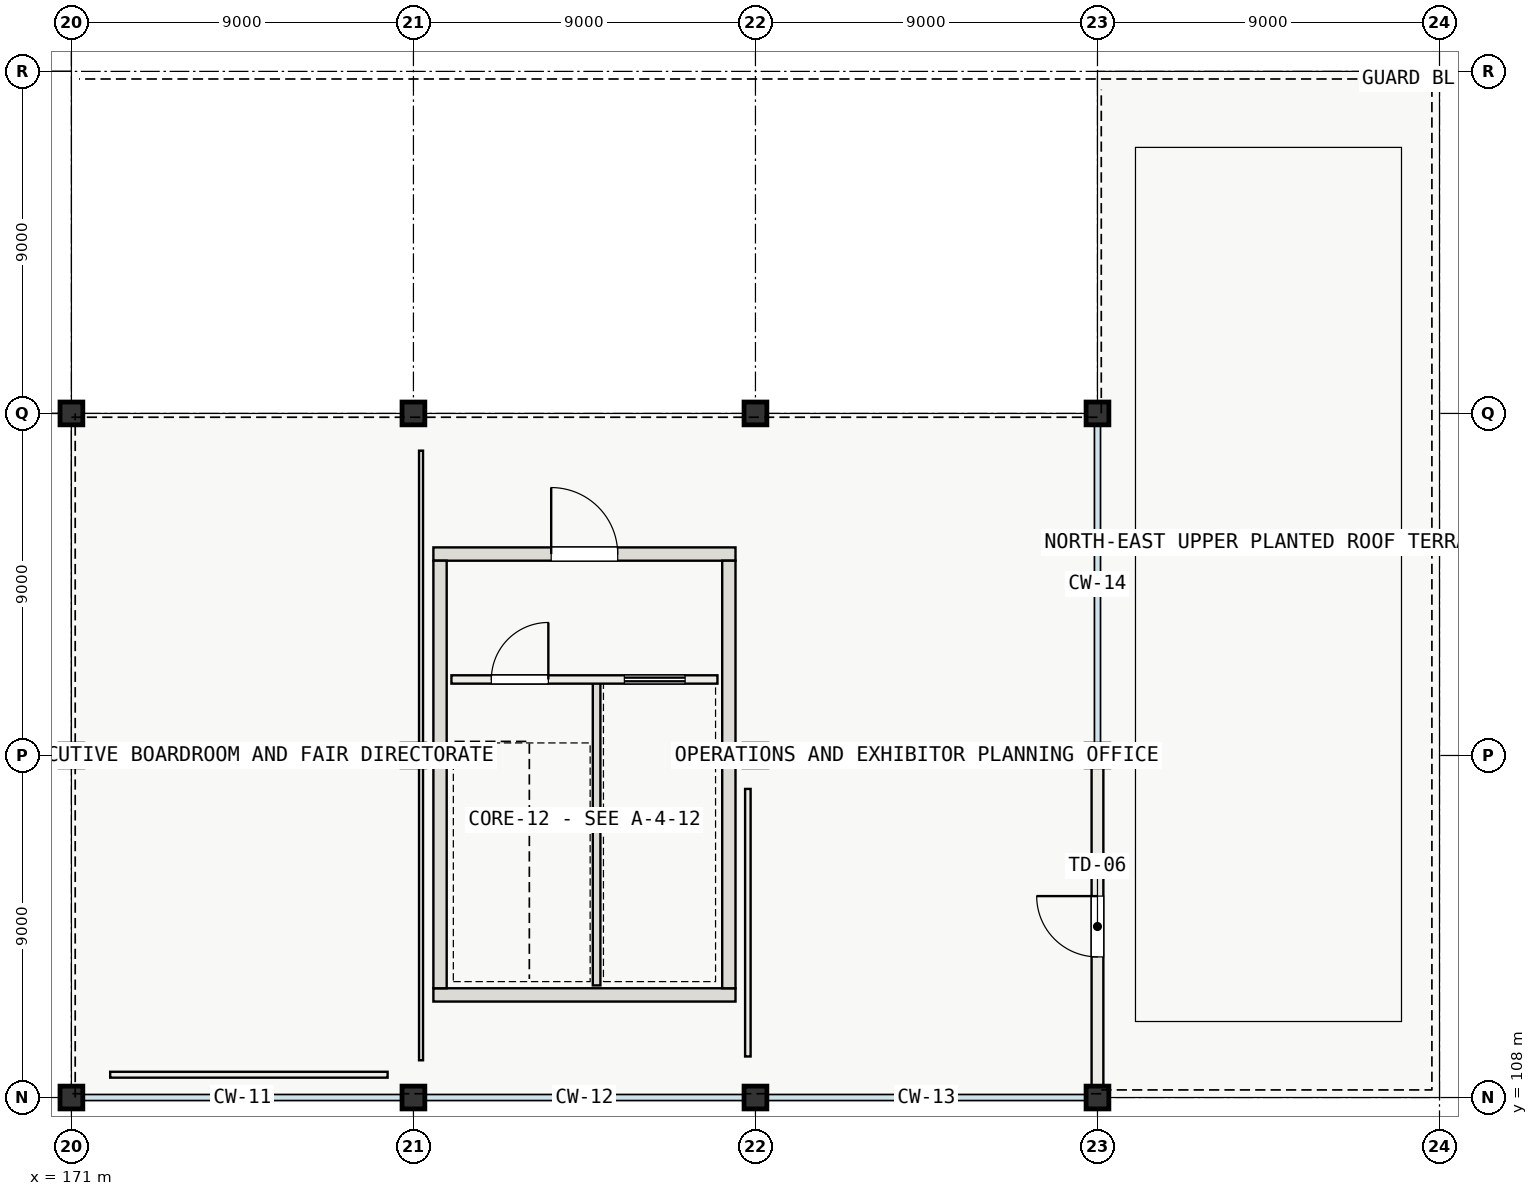
"""IFC4 building model, lengths in metres.
Left out: names, types, materials, properties, quantities, classifications, styles, units other than length and angle.
Written with IfcOpenShell. Run it as: python <this file> out.ifc"""

import sys

from ifc_helpers import new_model, si_unit, direction, frame, frame_2d, origin, origin_2d, place, context, subcontext, project, spatial, rectangle, extrude, element, fill, save


model = new_model("IFC4")
c1 = context("Model", 3, precision=1e-05, world=origin(), true_north=direction((0.0, 1.0)))
c2 = subcontext(c1, "Body", "Model", "MODEL_VIEW")
j1 = project(units=[si_unit("LENGTHUNIT", "METRE"), si_unit("PLANEANGLEUNIT", "RADIAN")], contexts=[c1])
p1 = place(None, origin())
s1 = spatial("IfcSite", under=j1, at=p1, CompositionType="ELEMENT")
p2 = place(p1, origin())
s2 = spatial("IfcBuilding", under=s1, at=p2, CompositionType="ELEMENT")
p3 = place(p2, frame((0.0, 0.0, 16.8)))
s3 = spatial("IfcBuildingStorey", under=s2, at=p3, CompositionType="ELEMENT", Elevation=16.8)
p4 = place(p3, frame((180.525, 110.7, 0.0), z_axis=(0.0, 0.0, 1.0), x_axis=(1.0, 0.0, 0.0)))
e1 = element("IfcWall", 1, at=p4, inside=s3, PredefinedType="SHEAR", context=c2, shape_type="SweptSolid", body=[
    extrude(rectangle(XDim=7.95, YDim=0.35, at=frame_2d((3.975, 0.0))), origin(), (0.0, 0.0, 1.0), 4.8),
])
p5 = place(p3, frame((180.525, 122.3, 0.0), z_axis=(0.0, 0.0, 1.0), x_axis=(1.0, 0.0, 0.0)))
e2 = element("IfcWall", 2, at=p5, inside=s3, PredefinedType="SHEAR", context=c2, shape_type="SweptSolid", body=[
    extrude(rectangle(XDim=7.95, YDim=0.35, at=frame_2d((3.975, 0.0))), origin(), (0.0, 0.0, 1.0), 4.8),
])
p6 = place(p5, frame((3.1, 0.0, 0.0)))
e3 = element("IfcOpeningElement", 3, at=p6, cuts=e2, PredefinedType="OPENING", context=c2, shape_type="SweptSolid", body=[
    extrude(rectangle(XDim=1.75, YDim=2.3, at=frame_2d((0.875, 1.15))), frame((0.0, 0.185, 0.0), z_axis=(0.0, -1.0, 0.0), x_axis=(1.0, 0.0, 0.0)), (0.0, 0.0, 1.0), 0.37),
])
for number, where, z_axis, x_axis in (
    (4, (180.7, 110.875, 0.0), (0.0, 0.0, 1.0), (0.0, 1.0, 0.0)),
    (5, (188.3, 110.875, 0.0), (0.0, 0.0, 1.0), (0.0, 1.0, 0.0)),
):
    element("IfcWall", number, at=place(p3, frame(where, z_axis=z_axis, x_axis=x_axis)), inside=s3, PredefinedType="SHEAR", context=c2, shape_type="SweptSolid", body=[
        extrude(rectangle(XDim=11.25, YDim=0.35, at=frame_2d((5.625, 0.0))), origin(), (0.0, 0.0, 1.0), 4.8),
    ])
for number, where, z_axis, x_axis in (
    (6, (171.0, 108.0, 0.0), (0.0, 0.0, 1.0), (1.0, 0.0, 0.0)),
    (7, (171.0, 117.0, 0.0), (0.0, 0.0, 1.0), (1.0, 0.0, 0.0)),
    (8, (171.0, 126.0, 0.0), (0.0, 0.0, 1.0), (1.0, 0.0, 0.0)),
    (9, (180.0, 108.0, 0.0), (0.0, 0.0, 1.0), (1.0, 0.0, 0.0)),
    (10, (180.0, 117.0, 0.0), (0.0, 0.0, 1.0), (1.0, 0.0, 0.0)),
    (11, (180.0, 126.0, 0.0), (0.0, 0.0, 1.0), (1.0, 0.0, 0.0)),
    (12, (189.0, 108.0, 0.0), (0.0, 0.0, 1.0), (1.0, 0.0, 0.0)),
    (13, (189.0, 117.0, 0.0), (0.0, 0.0, 1.0), (1.0, 0.0, 0.0)),
    (14, (189.0, 126.0, 0.0), (0.0, 0.0, 1.0), (1.0, 0.0, 0.0)),
    (15, (198.0, 108.0, 0.0), (0.0, 0.0, 1.0), (1.0, 0.0, 0.0)),
    (16, (198.0, 117.0, 0.0), (0.0, 0.0, 1.0), (1.0, 0.0, 0.0)),
    (17, (198.0, 126.0, 0.0), (0.0, 0.0, 1.0), (1.0, 0.0, 0.0)),
):
    element("IfcColumn", number, at=place(p3, frame(where, z_axis=z_axis, x_axis=x_axis)), inside=s3, PredefinedType="COLUMN", context=c2, shape_type="SweptSolid", body=[
        extrude(rectangle(XDim=0.6, YDim=0.6, at=origin_2d()), origin(), (0.0, 0.0, 1.0), 4.8),
    ])
p7 = place(p3, frame((198.0, 108.3, 0.0), z_axis=(0.0, 0.0, 1.0), x_axis=(0.0, 1.0, 0.0)))
e18 = element("IfcWall", 18, at=p7, inside=s3, PredefinedType="SOLIDWALL", context=c2, shape_type="SweptSolid", body=[
    extrude(rectangle(XDim=8.401, YDim=0.31, at=frame_2d((4.2, 0.0))), origin(), (0.0, 0.0, 1.0), 4.02),
])
p8 = place(p7, frame((3.4, 0.0, 0.0)))
e19 = element("IfcOpeningElement", 19, at=p8, cuts=e18, PredefinedType="OPENING", context=c2, shape_type="SweptSolid", body=[
    extrude(rectangle(XDim=1.6, YDim=2.2, at=frame_2d((0.8, 1.1))), frame((0.0, 0.165, 0.0), z_axis=(0.0, -1.0, 0.0), x_axis=(1.0, 0.0, 0.0)), (0.0, 0.0, 1.0), 0.33),
])
p9 = place(p3, frame((184.82, 110.95, 0.0), z_axis=(0.0, 0.0, 1.0), x_axis=(0.0, 1.0, 0.0)))
e20 = element("IfcWall", 20, at=p9, inside=s3, PredefinedType="SOLIDWALL", context=c2, shape_type="SweptSolid", body=[
    extrude(rectangle(XDim=8.0, YDim=0.2, at=frame_2d((4.0, 0.0))), origin(), (0.0, 0.0, 1.0), 4.8),
])
p10 = place(p3, frame((181.0, 119.0, 0.0), z_axis=(0.0, 0.0, 1.0), x_axis=(1.0, 0.0, 0.0)))
e21 = element("IfcWall", 21, at=p10, inside=s3, PredefinedType="SOLIDWALL", context=c2, shape_type="SweptSolid", body=[
    extrude(rectangle(XDim=7.0, YDim=0.22, at=frame_2d((3.5, 0.0))), origin(), (0.0, 0.0, 1.0), 4.49),
])
p11 = place(p10, frame((1.05, 0.0, 0.0)))
e22 = element("IfcOpeningElement", 22, at=p11, cuts=e21, PredefinedType="OPENING", context=c2, shape_type="SweptSolid", body=[
    extrude(rectangle(XDim=1.5, YDim=2.2, at=frame_2d((0.75, 1.1))), frame((0.0, 0.12, 0.0), z_axis=(0.0, -1.0, 0.0), x_axis=(1.0, 0.0, 0.0)), (0.0, 0.0, 1.0), 0.24),
])
p12 = place(p10, frame((4.55, 0.0, 0.0)))
e23 = element("IfcOpeningElement", 23, at=p12, cuts=e21, PredefinedType="OPENING", context=c2, shape_type="SweptSolid", body=[
    extrude(rectangle(XDim=1.6, YDim=2.3, at=frame_2d((0.8, 1.15))), frame((0.0, 0.12, 0.0), z_axis=(0.0, -1.0, 0.0), x_axis=(1.0, 0.0, 0.0)), (0.0, 0.0, 1.0), 0.24),
])
p13 = place(p3, frame((180.2, 108.98, 0.0), z_axis=(0.0, 0.0, 1.0), x_axis=(0.0, 1.0, 0.0)))
e24 = element("IfcWall", 24, at=p13, inside=s3, PredefinedType="PARTITIONING", context=c2, shape_type="SweptSolid", body=[
    extrude(rectangle(XDim=16.04, YDim=0.105, at=frame_2d((8.02, 0.0))), origin(), (0.0, 0.0, 1.0), 3.5),
])
p14 = place(p3, frame((172.02, 108.6, 0.0), z_axis=(0.0, 0.0, 1.0), x_axis=(1.0, 0.0, 0.0)))
e25 = element("IfcWall", 25, at=p14, inside=s3, PredefinedType="PARTITIONING", context=c2, shape_type="SweptSolid", body=[
    extrude(rectangle(XDim=7.3, YDim=0.155, at=frame_2d((3.65, 0.0))), origin(), (0.0, 0.0, 1.0), 3.5),
])
p15 = place(p3, frame((188.8, 109.08, 0.0), z_axis=(0.0, 0.0, 1.0), x_axis=(0.0, 1.0, 0.0)))
e26 = element("IfcWall", 26, at=p15, inside=s3, PredefinedType="PARTITIONING", context=c2, shape_type="SweptSolid", body=[
    extrude(rectangle(XDim=7.04, YDim=0.145, at=frame_2d((3.52, 0.0))), origin(), (0.0, 0.0, 1.0), 3.5),
])
p16 = place(p8, frame((1.6, 0.0, 0.0), z_axis=(0.0, 0.0, 1.0), x_axis=(-1.0, 0.0, 0.0)))
e27 = element("IfcDoor", 27, at=p16, inside=s3, OperationType="SINGLE_SWING_RIGHT", PredefinedType="DOOR", context=c2, shape_type="SweptSolid", body=[
    extrude(rectangle(XDim=1.6, YDim=2.2, at=frame_2d((0.8, 1.1))), frame((0.0, 0.025, 0.0), z_axis=(0.0, -1.0, 0.0), x_axis=(1.0, 0.0, 0.0)), (0.0, 0.0, 1.0), 0.05),
])
fill(e19, e27)
p17 = place(p11, origin())
e28 = element("IfcDoor", 28, at=p17, inside=s3, OperationType="SINGLE_SWING_RIGHT", PredefinedType="DOOR", context=c2, shape_type="SweptSolid", body=[
    extrude(rectangle(XDim=1.5, YDim=2.2, at=frame_2d((0.75, 1.1))), frame((0.0, 0.025, 0.0), z_axis=(0.0, -1.0, 0.0), x_axis=(1.0, 0.0, 0.0)), (0.0, 0.0, 1.0), 0.05),
])
fill(e22, e28)
p18 = place(p12, origin())
e29 = element("IfcDoor", 29, at=p18, inside=s3, OperationType="SLIDING_TO_RIGHT", PredefinedType="DOOR", context=c2, shape_type="SweptSolid", body=[
    extrude(rectangle(XDim=1.6, YDim=2.3, at=frame_2d((0.8, 1.15))), frame((0.0, 0.025, 0.0), z_axis=(0.0, -1.0, 0.0), x_axis=(1.0, 0.0, 0.0)), (0.0, 0.0, 1.0), 0.05),
])
fill(e23, e29)
p19 = place(p6, origin())
e30 = element("IfcDoor", 30, at=p19, inside=s3, OperationType="DOUBLE_DOOR_SINGLE_SWING", PredefinedType="DOOR", context=c2, shape_type="SweptSolid", body=[
    extrude(rectangle(XDim=1.75, YDim=2.3, at=frame_2d((0.875, 1.15))), frame((0.0, 0.025, 0.0), z_axis=(0.0, -1.0, 0.0), x_axis=(1.0, 0.0, 0.0)), (0.0, 0.0, 1.0), 0.05),
])
fill(e3, e30)
save(model, sys.argv[1])
